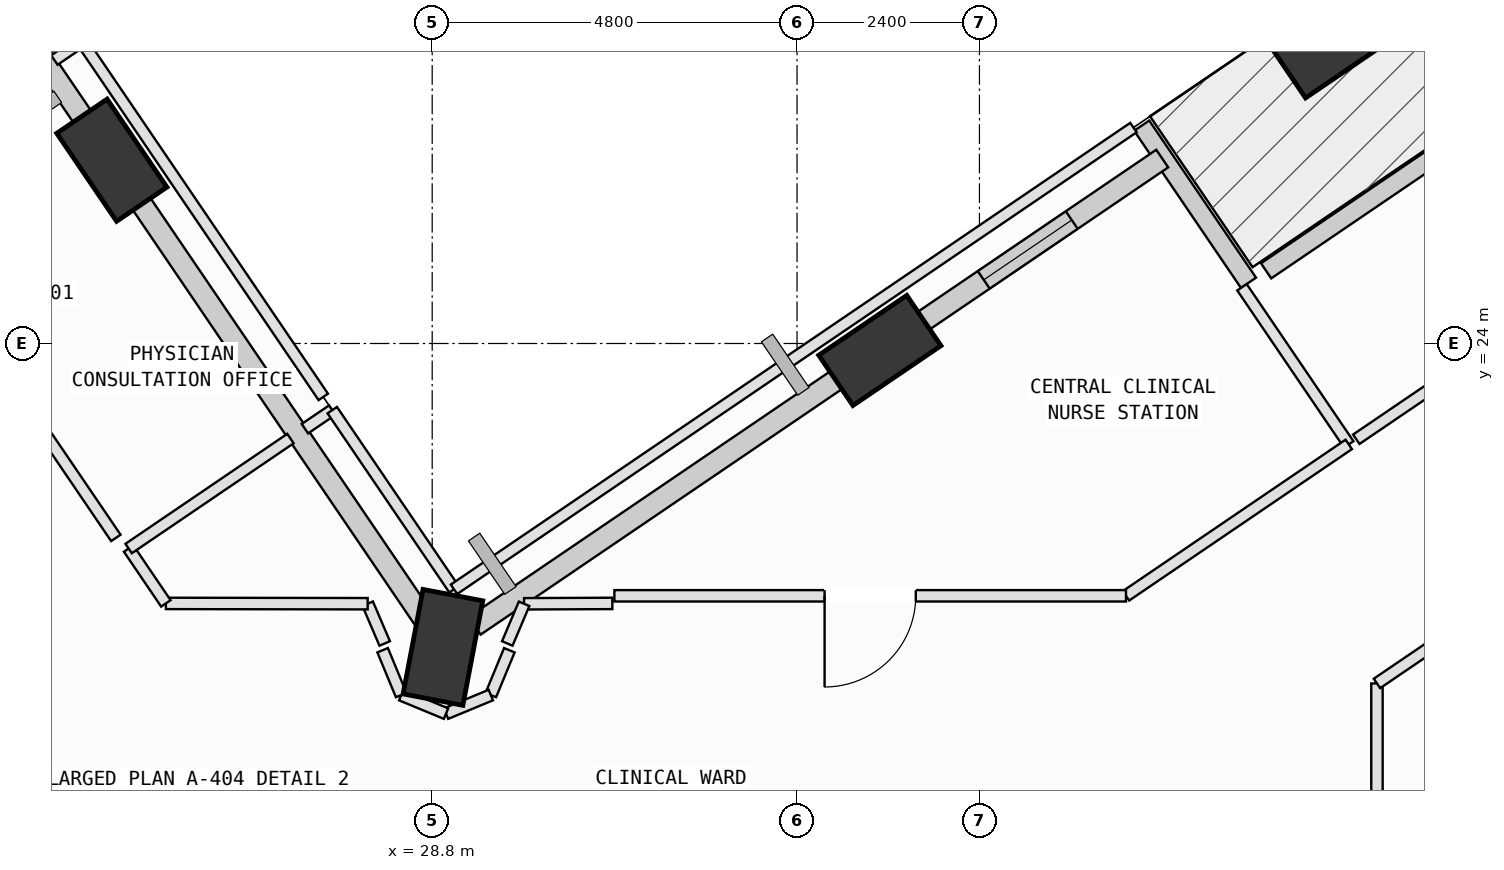
"""IFC4 building model, lengths in metres.
Left out: names, types, materials, properties, quantities, classifications, styles, units other than length and angle.
Written with IfcOpenShell. Run it as: python <this file> out.ifc"""

import sys

from ifc_helpers import new_model, si_unit, direction, frame, frame_2d, origin, origin_2d, place, context, subcontext, project, spatial, rectangle, extrude, element, fill, save


model = new_model("IFC4")
c1 = context("Model", 3, precision=1e-05, world=origin(), true_north=direction((0.0, 1.0)))
c2 = subcontext(c1, "Body", "Model", "MODEL_VIEW")
j1 = project(units=[si_unit("LENGTHUNIT", "METRE"), si_unit("PLANEANGLEUNIT", "RADIAN")], contexts=[c1])
p1 = place(None, origin())
s1 = spatial("IfcSite", under=j1, at=p1, CompositionType="ELEMENT")
p2 = place(p1, origin())
s2 = spatial("IfcBuilding", under=s1, at=p2, CompositionType="ELEMENT")
p3 = place(p2, frame((0.0, 0.0, 169.8)))
s3 = spatial("IfcBuildingStorey", under=s2, at=p3, CompositionType="ELEMENT", Elevation=169.8)
p4 = place(p3, frame((40.645, 27.955, 0.002), z_axis=(-0.013311050234, 0.029064495006, 0.999488904927), x_axis=(-0.518042365863, -0.855166206811, 0.017968469588)))
e1 = element("IfcColumn", 1, at=p4, inside=s3, PredefinedType="COLUMN", context=c2, shape_type="SweptSolid", body=[
    extrude(rectangle(XDim=1.4, YDim=0.8, at=origin_2d()), origin(), (0.0, 0.0, 1.0), 3.998),
])
p5 = place(p3, frame((34.69, 23.908, 0.002), z_axis=(0.003665402111, 0.004581752639, 0.999982786037), x_axis=(-0.996966081453, 0.077767316045, 0.003298027747)))
e2 = element("IfcColumn", 2, at=p5, inside=s3, PredefinedType="COLUMN", context=c2, shape_type="SweptSolid", body=[
    extrude(rectangle(XDim=1.4, YDim=0.8, at=origin_2d()), origin(), (0.0, 0.0, 1.0), 3.996),
])
p6 = place(p3, frame((28.941, 20.002, 0.002), z_axis=(0.020030194878, -0.019114179869, 0.99961664623), x_axis=(-0.581006277016, 0.813444565277, 0.027196420538)))
e3 = element("IfcColumn", 3, at=p6, inside=s3, PredefinedType="COLUMN", context=c2, shape_type="SweptSolid", body=[
    extrude(rectangle(XDim=1.4, YDim=0.8, at=origin_2d()), origin(), (0.0, 0.0, 1.0), 3.998),
])
p7 = place(p3, frame((24.585, 26.412, 0.002), z_axis=(-0.006348894644, -0.03742185016, 0.999279388693), x_axis=(-0.415920743868, 0.908858847137, 0.031393164881)))
e4 = element("IfcColumn", 4, at=p7, inside=s3, PredefinedType="COLUMN", context=c2, shape_type="SweptSolid", body=[
    extrude(rectangle(XDim=1.4, YDim=0.8, at=origin_2d()), origin(), (0.0, 0.0, 1.0), 3.999),
])
p8 = place(p3, frame((39.771, 24.956, 0.0), z_axis=(0.0, 0.0, 1.0), x_axis=(0.827085007345, 0.562076854731, 0.0)))
e5 = element("IfcWall", 5, at=p8, inside=s3, PredefinedType="SOLIDWALL", context=c2, shape_type="SweptSolid", body=[
    extrude(rectangle(XDim=6.96, YDim=0.24, at=frame_2d((3.48, 0.0))), origin(), (0.0, 0.0, 1.0), 3.065),
])
p9 = place(p8, frame((2.93, 0.0, 0.0)))
e6 = element("IfcOpeningElement", 6, at=p9, cuts=e5, PredefinedType="OPENING", context=c2, shape_type="SweptSolid", body=[
    extrude(rectangle(XDim=1.1, YDim=2.15, at=frame_2d((0.55, 1.075))), frame((0.0, 0.13, 0.0), z_axis=(0.0, -1.0, 0.0), x_axis=(1.0, 0.0, 0.0)), (0.0, 0.0, 1.0), 0.26),
])
p10 = place(p3, frame((38.135, 26.866, 0.0), z_axis=(0.0, 0.0, 1.0), x_axis=(0.562115011853, -0.827059074945, 0.0)))
e7 = element("IfcWall", 7, at=p10, inside=s3, PredefinedType="SOLIDWALL", context=c2, shape_type="SweptSolid", body=[
    extrude(rectangle(XDim=2.5, YDim=0.24, at=frame_2d((1.25, 0.0))), origin(), (0.0, 0.0, 1.0), 3.165),
])
p11 = place(p3, frame((35.109, 24.194, 0.0), z_axis=(0.0, 0.0, 1.0), x_axis=(0.827087163795, 0.562073681545, 0.0)))
e8 = element("IfcWall", 8, at=p11, inside=s3, PredefinedType="SOLIDWALL", context=c2, shape_type="SweptSolid", body=[
    extrude(rectangle(XDim=3.984, YDim=0.28, at=frame_2d((1.992, 0.0))), origin(), (0.0, 0.0, 1.0), 3.165),
])
p12 = place(p11, frame((1.145, 0.0, 0.75)))
e9 = element("IfcOpeningElement", 9, at=p12, cuts=e8, PredefinedType="OPENING", context=c2, shape_type="SweptSolid", body=[
    extrude(rectangle(XDim=1.4, YDim=1.85, at=frame_2d((0.7, 0.925))), frame((0.0, 0.15, 0.0), z_axis=(0.0, -1.0, 0.0), x_axis=(1.0, 0.0, 0.0)), (0.0, 0.0, 1.0), 0.3),
])
p13 = place(p3, frame((29.359, 20.286, 0.0), z_axis=(0.0, 0.0, 1.0), x_axis=(0.82710854775, 0.56204221393, 0.0)))
e10 = element("IfcWall", 10, at=p13, inside=s3, PredefinedType="SOLIDWALL", context=c2, shape_type="SweptSolid", body=[
    extrude(rectangle(XDim=5.96, YDim=0.28, at=frame_2d((2.98, 0.0))), origin(), (0.0, 0.0, 1.0), 3.165),
])
p14 = place(p3, frame((28.693, 20.367, 0.0), z_axis=(0.0, 0.0, 1.0), x_axis=(-0.562095643109, 0.827072238682, 0.0)))
e11 = element("IfcWall", 11, at=p14, inside=s3, PredefinedType="SOLIDWALL", context=c2, shape_type="SweptSolid", body=[
    extrude(rectangle(XDim=6.76, YDim=0.28, at=frame_2d((3.38, 0.0))), origin(), (0.0, 0.0, 1.0), 3.165),
])
p15 = place(p3, frame((24.339, 26.774, 0.0), z_axis=(0.0, 0.0, 1.0), x_axis=(-0.56206639417, 0.827092116118, 0.0)))
e12 = element("IfcWall", 12, at=p15, inside=s3, PredefinedType="SOLIDWALL", context=c2, shape_type="SweptSolid", body=[
    extrude(rectangle(XDim=6.223, YDim=0.28, at=frame_2d((3.111, 0.0))), origin(), (0.0, 0.0, 1.0), 3.145),
])
p16 = place(p15, frame((3.011, 0.0, 0.75)))
e13 = element("IfcOpeningElement", 13, at=p16, cuts=e12, PredefinedType="OPENING", context=c2, shape_type="SweptSolid", body=[
    extrude(rectangle(XDim=1.6, YDim=1.95, at=frame_2d((0.8, 0.975))), frame((0.0, 0.15, 0.0), z_axis=(0.0, -1.0, 0.0), x_axis=(1.0, 0.0, 0.0)), (0.0, 0.0, 1.0), 0.3),
])
p17 = place(p3, frame((41.23, 17.95, 0.0), z_axis=(0.0, 0.0, 1.0), x_axis=(0.0, 1.0, 0.0)))
e14 = element("IfcWall", 14, at=p17, inside=s3, PredefinedType="PARTITIONING", context=c2, shape_type="SweptSolid", body=[
    extrude(rectangle(XDim=1.577, YDim=0.15, at=frame_2d((0.789, 0.0))), origin(), (0.0, 0.0, 1.0), 3.78),
])
p18 = place(p3, frame((41.23, 19.527, 0.0), z_axis=(0.0, 0.0, 1.0), x_axis=(0.827060374775, 0.562113099364, 0.0)))
e15 = element("IfcWall", 15, at=p18, inside=s3, PredefinedType="PARTITIONING", context=c2, shape_type="SweptSolid", body=[
    extrude(rectangle(XDim=6.918, YDim=0.15, at=frame_2d((3.459, 0.0))), origin(), (0.0, 0.0, 1.0), 3.065),
])
p19 = place(p18, frame((2.859, 0.0, 0.0)))
e16 = element("IfcOpeningElement", 16, at=p19, cuts=e15, PredefinedType="OPENING", context=c2, shape_type="SweptSolid", body=[
    extrude(rectangle(XDim=1.2, YDim=2.15, at=frame_2d((0.6, 1.075))), frame((0.0, 0.085, 0.0), z_axis=(0.0, -1.0, 0.0), x_axis=(1.0, 0.0, 0.0)), (0.0, 0.0, 1.0), 0.17),
])
p20 = place(p3, frame((31.17, 20.58, 0.0), z_axis=(0.0, 0.0, 1.0), x_axis=(-0.999990247831, -0.004416360716, 0.0)))
e17 = element("IfcWall", 17, at=p20, inside=s3, PredefinedType="PARTITIONING", context=c2, shape_type="SweptSolid", body=[
    extrude(rectangle(XDim=1.161, YDim=0.15, at=frame_2d((0.581, 0.0))), origin(), (0.0, 0.0, 1.0), 3.78),
])
p21 = place(p3, frame((30.009, 20.575, 0.0), z_axis=(0.0, 0.0, 1.0), x_axis=(-0.389808600433, -0.920895898041, 0.0)))
e18 = element("IfcWall", 18, at=p21, inside=s3, PredefinedType="PARTITIONING", context=c2, shape_type="SweptSolid", body=[
    extrude(rectangle(XDim=0.567, YDim=0.15, at=frame_2d((0.283, 0.0))), origin(), (0.0, 0.0, 1.0), 3.78),
])
p22 = place(p3, frame((29.815, 19.964, 0.0), z_axis=(0.0, 0.0, 1.0), x_axis=(-0.381980268386, -0.924170479167, 0.0)))
e19 = element("IfcWall", 19, at=p22, inside=s3, PredefinedType="PARTITIONING", context=c2, shape_type="SweptSolid", body=[
    extrude(rectangle(XDim=0.638, YDim=0.15, at=frame_2d((0.319, 0.0))), origin(), (0.0, 0.0, 1.0), 3.78),
])
p23 = place(p3, frame((29.571, 19.374, 0.0), z_axis=(0.0, 0.0, 1.0), x_axis=(-0.923811477415, -0.382847690599, 0.0)))
e20 = element("IfcWall", 20, at=p23, inside=s3, PredefinedType="PARTITIONING", context=c2, shape_type="SweptSolid", body=[
    extrude(rectangle(XDim=0.638, YDim=0.15, at=frame_2d((0.319, 0.0))), origin(), (0.0, 0.0, 1.0), 3.415),
])
p24 = place(p3, frame((28.982, 19.13, 0.0), z_axis=(0.0, 0.0, 1.0), x_axis=(-0.923979554509, 0.382441868588, 0.0)))
e21 = element("IfcWall", 21, at=p24, inside=s3, PredefinedType="PARTITIONING", context=c2, shape_type="SweptSolid", body=[
    extrude(rectangle(XDim=0.638, YDim=0.15, at=frame_2d((0.319, 0.0))), origin(), (0.0, 0.0, 1.0), 3.78),
])
p25 = place(p3, frame((28.392, 19.374, 0.0), z_axis=(0.0, 0.0, 1.0), x_axis=(-0.382306769343, 0.924035461503, 0.0)))
e22 = element("IfcWall", 22, at=p25, inside=s3, PredefinedType="PARTITIONING", context=c2, shape_type="SweptSolid", body=[
    extrude(rectangle(XDim=0.639, YDim=0.15, at=frame_2d((0.319, 0.0))), origin(), (0.0, 0.0, 1.0), 3.78),
])
p26 = place(p3, frame((28.175, 20.053, 0.0), z_axis=(0.0, 0.0, 1.0), x_axis=(-0.393919298579, 0.919145030018, 0.0)))
e23 = element("IfcWall", 23, at=p26, inside=s3, PredefinedType="PARTITIONING", context=c2, shape_type="SweptSolid", body=[
    extrude(rectangle(XDim=0.569, YDim=0.15, at=frame_2d((0.284, 0.0))), origin(), (0.0, 0.0, 1.0), 3.78),
])
p27 = place(p3, frame((27.951, 20.576, 0.0), z_axis=(0.0, 0.0, 1.0), x_axis=(-0.999998778176, 0.001563216481, 0.0)))
e24 = element("IfcWall", 24, at=p27, inside=s3, PredefinedType="PARTITIONING", context=c2, shape_type="SweptSolid", body=[
    extrude(rectangle(XDim=2.655, YDim=0.15, at=frame_2d((1.328, 0.0))), origin(), (0.0, 0.0, 1.0), 3.78),
])
p28 = place(p3, frame((25.296, 20.58, 0.0), z_axis=(0.0, 0.0, 1.0), x_axis=(-0.561590369645, 0.827415407593, 0.0)))
e25 = element("IfcWall", 25, at=p28, inside=s3, PredefinedType="PARTITIONING", context=c2, shape_type="SweptSolid", body=[
    extrude(rectangle(XDim=0.873, YDim=0.15, at=frame_2d((0.436, 0.0))), origin(), (0.0, 0.0, 1.0), 3.415),
])
p29 = place(p3, frame((24.806, 21.302, 0.0), z_axis=(0.0, 0.0, 1.0), x_axis=(0.827071116289, 0.562097294604, 0.0)))
e26 = element("IfcWall", 26, at=p29, inside=s3, PredefinedType="PARTITIONING", context=c2, shape_type="SweptSolid", body=[
    extrude(rectangle(XDim=2.574, YDim=0.15, at=frame_2d((1.287, 0.0))), origin(), (0.0, 0.0, 1.0), 3.78),
])
p30 = place(p3, frame((27.125, 22.879, 0.0), z_axis=(0.0, 0.0, 1.0), x_axis=(0.827708498205, 0.561158303868, 0.0)))
e27 = element("IfcWall", 27, at=p30, inside=s3, PredefinedType="PARTITIONING", context=c2, shape_type="SweptSolid", body=[
    extrude(rectangle(XDim=0.435, YDim=0.15, at=frame_2d((0.218, 0.0))), origin(), (0.0, 0.0, 1.0), 3.78),
])
p31 = place(p3, frame((27.485, 23.123, 0.0), z_axis=(0.0, 0.0, 1.0), x_axis=(0.562092073302, -0.827074664786, 0.0)))
e28 = element("IfcWall", 28, at=p31, inside=s3, PredefinedType="PARTITIONING", context=c2, shape_type="SweptSolid", body=[
    extrude(rectangle(XDim=2.85, YDim=0.15, at=frame_2d((1.425, 0.0))), origin(), (0.0, 0.0, 1.0), 3.78),
])
p32 = place(p3, frame((29.087, 20.766, 0.0), z_axis=(0.0, 0.0, 1.0), x_axis=(0.82707898546, 0.562085715715, 0.0)))
e29 = element("IfcWall", 29, at=p32, inside=s3, PredefinedType="PARTITIONING", context=c2, shape_type="SweptSolid", body=[
    extrude(rectangle(XDim=10.808, YDim=0.15, at=frame_2d((5.404, 0.0))), origin(), (0.0, 0.0, 1.0), 3.78),
])
p33 = place(p3, frame((39.454, 24.74, 0.0), z_axis=(0.0, 0.0, 1.0), x_axis=(0.561935992116, -0.827180718322, 0.0)))
e30 = element("IfcWall", 30, at=p33, inside=s3, PredefinedType="PARTITIONING", context=c2, shape_type="SweptSolid", body=[
    extrude(rectangle(XDim=2.5, YDim=0.15, at=frame_2d((1.25, 0.0))), origin(), (0.0, 0.0, 1.0), 3.78),
])
p34 = place(p3, frame((40.859, 22.672, 0.0), z_axis=(0.0, 0.0, 1.0), x_axis=(-0.827035400528, -0.562149843257, 0.0)))
e31 = element("IfcWall", 31, at=p34, inside=s3, PredefinedType="PARTITIONING", context=c2, shape_type="SweptSolid", body=[
    extrude(rectangle(XDim=3.544, YDim=0.15, at=frame_2d((1.772, 0.0))), origin(), (0.0, 0.0, 1.0), 3.065),
])
p35 = place(p3, frame((37.928, 20.68, 0.0), z_axis=(0.0, 0.0, 1.0), x_axis=(-1.0, 0.0, 0.0)))
e32 = element("IfcWall", 32, at=p35, inside=s3, PredefinedType="PARTITIONING", context=c2, shape_type="SweptSolid", body=[
    extrude(rectangle(XDim=6.731, YDim=0.15, at=frame_2d((3.365, 0.0))), origin(), (0.0, 0.0, 1.0), 3.415),
])
p36 = place(p35, frame((2.765, 0.0, 0.0)))
e33 = element("IfcOpeningElement", 33, at=p36, cuts=e32, PredefinedType="OPENING", context=c2, shape_type="SweptSolid", body=[
    extrude(rectangle(XDim=1.2, YDim=2.15, at=frame_2d((0.6, 1.075))), frame((0.0, 0.085, 0.0), z_axis=(0.0, -1.0, 0.0), x_axis=(1.0, 0.0, 0.0)), (0.0, 0.0, 1.0), 0.17),
])
p37 = place(p3, frame((49.914, 28.826, 0.0), z_axis=(0.0, 0.0, 1.0), x_axis=(-0.827105946098, -0.562046042535, 0.0)))
e34 = element("IfcWall", 34, at=p37, inside=s3, PredefinedType="PARTITIONING", context=c2, shape_type="SweptSolid", body=[
    extrude(rectangle(XDim=10.828, YDim=0.15, at=frame_2d((5.414, 0.0))), origin(), (0.0, 0.0, 1.0), 3.78),
])
p38 = place(p37, frame((4.814, 0.0, 0.0)))
e35 = element("IfcOpeningElement", 35, at=p38, cuts=e34, PredefinedType="OPENING", context=c2, shape_type="SweptSolid", body=[
    extrude(rectangle(XDim=1.2, YDim=2.15, at=frame_2d((0.6, 1.075))), frame((0.0, 0.085, 0.0), z_axis=(0.0, -1.0, 0.0), x_axis=(1.0, 0.0, 0.0)), (0.0, 0.0, 1.0), 0.17),
])
p39 = place(p3, frame((24.638, 21.442, 0.0), z_axis=(0.0, 0.0, 1.0), x_axis=(-0.56213996743, 0.827042113207, 0.0)))
e36 = element("IfcWall", 36, at=p39, inside=s3, PredefinedType="PARTITIONING", context=c2, shape_type="SweptSolid", body=[
    extrude(rectangle(XDim=5.655, YDim=0.15, at=frame_2d((2.828, 0.0))), origin(), (0.0, 0.0, 1.0), 3.415),
])
p40 = place(p39, frame((2.328, 0.0, 0.0)))
e37 = element("IfcOpeningElement", 37, at=p40, cuts=e36, PredefinedType="OPENING", context=c2, shape_type="SweptSolid", body=[
    extrude(rectangle(XDim=1.0, YDim=2.12, at=frame_2d((0.5, 1.06))), frame((0.0, 0.085, 0.0), z_axis=(0.0, -1.0, 0.0), x_axis=(1.0, 0.0, 0.0)), (0.0, 0.0, 1.0), 0.17),
])
p41 = place(p3, frame((23.829, 27.729, 0.0), z_axis=(0.0, 0.0, 1.0), x_axis=(0.826488233945, 0.562953993813, 0.0)))
e38 = element("IfcWall", 38, at=p41, inside=s3, PredefinedType="PARTITIONING", context=c2, shape_type="SweptSolid", body=[
    extrude(rectangle(XDim=0.435, YDim=0.15, at=frame_2d((0.218, 0.0))), origin(), (0.0, 0.0, 1.0), 3.78),
])
p42 = place(p3, frame((24.189, 27.974, 0.0), z_axis=(0.0, 0.0, 1.0), x_axis=(0.562021832426, -0.827122397156, 0.0)))
e39 = element("IfcWall", 39, at=p42, inside=s3, PredefinedType="PARTITIONING", context=c2, shape_type="SweptSolid", body=[
    extrude(rectangle(XDim=5.655, YDim=0.15, at=frame_2d((2.827, 0.0))), origin(), (0.0, 0.0, 1.0), 3.78),
])
p43 = place(p12, origin())
e40 = element("IfcWindow", 40, at=p43, inside=s3, PartitioningType="SINGLE_PANEL", PredefinedType="WINDOW", context=c2, shape_type="SweptSolid", body=[
    extrude(rectangle(XDim=1.4, YDim=1.85, at=frame_2d((0.7, 0.925))), frame((0.0, 0.03, 0.0), z_axis=(0.0, -1.0, 0.0), x_axis=(1.0, 0.0, 0.0)), (0.0, 0.0, 1.0), 0.06),
])
fill(e9, e40)
p44 = place(p36, origin())
e41 = element("IfcDoor", 41, at=p44, inside=s3, OperationType="SINGLE_SWING_RIGHT", PredefinedType="DOOR", context=c2, shape_type="SweptSolid", body=[
    extrude(rectangle(XDim=1.2, YDim=2.15, at=frame_2d((0.6, 1.075))), frame((0.0, 0.025, 0.0), z_axis=(0.0, -1.0, 0.0), x_axis=(1.0, 0.0, 0.0)), (0.0, 0.0, 1.0), 0.05),
])
fill(e33, e41)
save(model, sys.argv[1])
